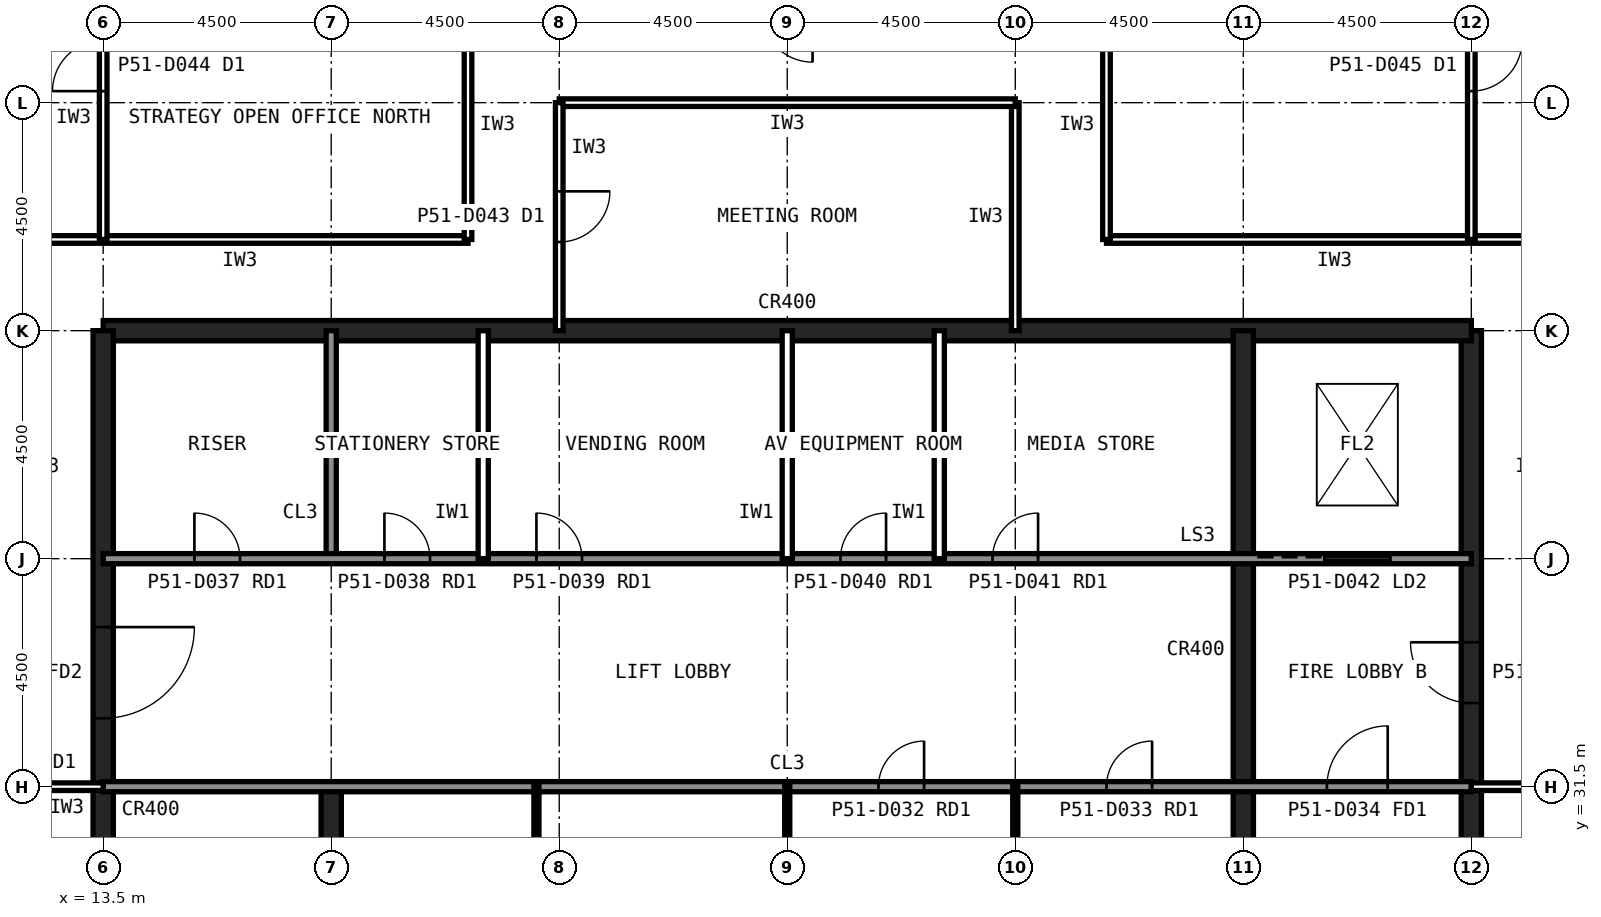
"""IFC4 building model, lengths in metres.
Left out: names, types, materials, properties, quantities, classifications, styles, units other than length and angle.
Written with IfcOpenShell. Run it as: python <this file> out.ifc"""

import sys

from ifc_helpers import new_model, si_unit, direction, frame, frame_2d, origin, place, context, subcontext, project, spatial, rectangle, extrude, element, fill, save


model = new_model("IFC4")
c1 = context("Model", 3, precision=1e-05, world=origin(), true_north=direction((0.0, 1.0)))
c2 = subcontext(c1, "Body", "Model", "MODEL_VIEW")
j1 = project(units=[si_unit("LENGTHUNIT", "METRE"), si_unit("PLANEANGLEUNIT", "RADIAN")], contexts=[c1])
p1 = place(None, origin())
s1 = spatial("IfcSite", under=j1, at=p1, CompositionType="ELEMENT")
p2 = place(p1, origin())
s2 = spatial("IfcBuilding", under=s1, at=p2, CompositionType="ELEMENT")
p3 = place(p2, frame((0.0, 0.0, 214.6)))
s3 = spatial("IfcBuildingStorey", under=s2, at=p3, CompositionType="ELEMENT", Elevation=214.6)
p4 = place(p3, frame((40.5, 13.5, 0.0), z_axis=(0.0, 0.0, 1.0), x_axis=(0.0, 1.0, 0.0)))
e1 = element("IfcWall", 1, at=p4, inside=s3, PredefinedType="SHEAR", context=c2, shape_type="SweptSolid", body=[
    extrude(rectangle(XDim=27.0, YDim=0.4, at=frame_2d((13.5, 0.0))), origin(), (0.0, 0.0, 1.0), 4.0),
])
p5 = place(p4, frame((5.85, 0.0, 0.0)))
e2 = element("IfcOpeningElement", 2, at=p5, cuts=e1, PredefinedType="OPENING", context=c2, shape_type="SweptSolid", body=[
    extrude(rectangle(XDim=1.8, YDim=2.1, at=frame_2d((0.9, 1.05))), frame((0.0, 0.21, 0.0), z_axis=(0.0, -1.0, 0.0), x_axis=(1.0, 0.0, 0.0)), (0.0, 0.0, 1.0), 0.42),
])
p6 = place(p4, frame((19.65, 0.0, 0.0)))
e3 = element("IfcOpeningElement", 3, at=p6, cuts=e1, PredefinedType="OPENING", context=c2, shape_type="SweptSolid", body=[
    extrude(rectangle(XDim=1.2, YDim=2.1, at=frame_2d((0.6, 1.05))), frame((0.0, 0.21, 0.0), z_axis=(0.0, -1.0, 0.0), x_axis=(1.0, 0.0, 0.0)), (0.0, 0.0, 1.0), 0.42),
])
p7 = place(p3, frame((40.5, 40.5, 0.0), z_axis=(0.0, 0.0, 1.0), x_axis=(-1.0, 0.0, 0.0)))
e4 = element("IfcWall", 4, at=p7, inside=s3, PredefinedType="SHEAR", context=c2, shape_type="SweptSolid", body=[
    extrude(rectangle(XDim=27.0, YDim=0.4, at=frame_2d((13.5, 0.0))), origin(), (0.0, 0.0, 1.0), 4.0),
])
p8 = place(p3, frame((13.5, 40.5, 0.0), z_axis=(0.0, 0.0, 1.0), x_axis=(0.0, -1.0, 0.0)))
e5 = element("IfcWall", 5, at=p8, inside=s3, PredefinedType="SHEAR", context=c2, shape_type="SweptSolid", body=[
    extrude(rectangle(XDim=27.0, YDim=0.4, at=frame_2d((13.5, 0.0))), origin(), (0.0, 0.0, 1.0), 4.0),
])
p9 = place(p8, frame((19.65, 0.0, 0.0)))
e6 = element("IfcOpeningElement", 6, at=p9, cuts=e5, PredefinedType="OPENING", context=c2, shape_type="SweptSolid", body=[
    extrude(rectangle(XDim=1.2, YDim=2.1, at=frame_2d((0.6, 1.05))), frame((0.0, 0.21, 0.0), z_axis=(0.0, -1.0, 0.0), x_axis=(1.0, 0.0, 0.0)), (0.0, 0.0, 1.0), 0.42),
])
p10 = place(p8, frame((5.85, 0.0, 0.0)))
e7 = element("IfcOpeningElement", 7, at=p10, cuts=e5, PredefinedType="OPENING", context=c2, shape_type="SweptSolid", body=[
    extrude(rectangle(XDim=1.8, YDim=2.1, at=frame_2d((0.9, 1.05))), frame((0.0, 0.21, 0.0), z_axis=(0.0, -1.0, 0.0), x_axis=(1.0, 0.0, 0.0)), (0.0, 0.0, 1.0), 0.42),
])
p11 = place(p3, frame((18.0, 13.5, 0.0), z_axis=(0.0, 0.0, 1.0), x_axis=(0.0, 1.0, 0.0)))
e8 = element("IfcWall", 8, at=p11, inside=s3, PredefinedType="SHEAR", context=c2, shape_type="SweptSolid", body=[
    extrude(rectangle(XDim=18.0, YDim=0.4, at=frame_2d((9.0, 0.0))), origin(), (0.0, 0.0, 1.0), 4.0),
])
p12 = place(p3, frame((18.0, 36.0, 0.0), z_axis=(0.0, 0.0, 1.0), x_axis=(0.0, 1.0, 0.0)))
e9 = element("IfcWall", 9, at=p12, inside=s3, PredefinedType="SOLIDWALL", context=c2, shape_type="SweptSolid", body=[
    extrude(rectangle(XDim=4.5, YDim=0.2, at=frame_2d((2.25, 0.0))), origin(), (0.0, 0.0, 1.0), 3.84),
])
p13 = place(p3, frame((36.0, 22.5, 0.0), z_axis=(0.0, 0.0, 1.0), x_axis=(0.0, 1.0, 0.0)))
e10 = element("IfcWall", 10, at=p13, inside=s3, PredefinedType="SHEAR", context=c2, shape_type="SweptSolid", body=[
    extrude(rectangle(XDim=18.0, YDim=0.4, at=frame_2d((9.0, 0.0))), origin(), (0.0, 0.0, 1.0), 4.0),
])
p14 = place(p3, frame((13.5, 36.0, 0.0), z_axis=(0.0, 0.0, 1.0), x_axis=(1.0, 0.0, 0.0)))
e11 = element("IfcWall", 11, at=p14, inside=s3, PredefinedType="SOLIDWALL", context=c2, shape_type="SweptSolid", body=[
    extrude(rectangle(XDim=27.0, YDim=0.2, at=frame_2d((13.5, 0.0))), origin(), (0.0, 0.0, 1.0), 3.84),
])
p15 = place(p14, frame((1.8, 0.0, 0.0)))
e12 = element("IfcOpeningElement", 12, at=p15, cuts=e11, PredefinedType="OPENING", context=c2, shape_type="SweptSolid", body=[
    extrude(rectangle(XDim=0.9, YDim=2.1, at=frame_2d((0.45, 1.05))), frame((0.0, 0.11, 0.0), z_axis=(0.0, -1.0, 0.0), x_axis=(1.0, 0.0, 0.0)), (0.0, 0.0, 1.0), 0.22),
])
p16 = place(p14, frame((5.55, 0.0, 0.0)))
e13 = element("IfcOpeningElement", 13, at=p16, cuts=e11, PredefinedType="OPENING", context=c2, shape_type="SweptSolid", body=[
    extrude(rectangle(XDim=0.9, YDim=2.1, at=frame_2d((0.45, 1.05))), frame((0.0, 0.11, 0.0), z_axis=(0.0, -1.0, 0.0), x_axis=(1.0, 0.0, 0.0)), (0.0, 0.0, 1.0), 0.22),
])
p17 = place(p14, frame((11.55, 0.0, 0.0)))
e14 = element("IfcOpeningElement", 14, at=p17, cuts=e11, PredefinedType="OPENING", context=c2, shape_type="SweptSolid", body=[
    extrude(rectangle(XDim=0.9, YDim=2.1, at=frame_2d((0.45, 1.05))), frame((0.0, 0.11, 0.0), z_axis=(0.0, -1.0, 0.0), x_axis=(1.0, 0.0, 0.0)), (0.0, 0.0, 1.0), 0.22),
])
p18 = place(p14, frame((14.55, 0.0, 0.0)))
e15 = element("IfcOpeningElement", 15, at=p18, cuts=e11, PredefinedType="OPENING", context=c2, shape_type="SweptSolid", body=[
    extrude(rectangle(XDim=0.9, YDim=2.1, at=frame_2d((0.45, 1.05))), frame((0.0, 0.11, 0.0), z_axis=(0.0, -1.0, 0.0), x_axis=(1.0, 0.0, 0.0)), (0.0, 0.0, 1.0), 0.22),
])
p19 = place(p14, frame((20.55, 0.0, 0.0)))
e16 = element("IfcOpeningElement", 16, at=p19, cuts=e11, PredefinedType="OPENING", context=c2, shape_type="SweptSolid", body=[
    extrude(rectangle(XDim=0.9, YDim=2.1, at=frame_2d((0.45, 1.05))), frame((0.0, 0.11, 0.0), z_axis=(0.0, -1.0, 0.0), x_axis=(1.0, 0.0, 0.0)), (0.0, 0.0, 1.0), 0.22),
])
p20 = place(p14, frame((24.1, 0.0, 0.0)))
e17 = element("IfcOpeningElement", 17, at=p20, cuts=e11, PredefinedType="OPENING", context=c2, shape_type="SweptSolid", body=[
    extrude(rectangle(XDim=1.3, YDim=2.2, at=frame_2d((0.65, 1.1))), frame((0.0, 0.11, 0.0), z_axis=(0.0, -1.0, 0.0), x_axis=(1.0, 0.0, 0.0)), (0.0, 0.0, 1.0), 0.22),
])
p21 = place(p3, frame((13.5, 31.5, 0.0), z_axis=(0.0, 0.0, 1.0), x_axis=(1.0, 0.0, 0.0)))
e18 = element("IfcWall", 18, at=p21, inside=s3, PredefinedType="SOLIDWALL", context=c2, shape_type="SweptSolid", body=[
    extrude(rectangle(XDim=27.0, YDim=0.2, at=frame_2d((13.5, 0.0))), origin(), (0.0, 0.0, 1.0), 3.84),
])
p22 = place(p21, frame((24.15, 0.0, 0.0)))
e19 = element("IfcOpeningElement", 19, at=p22, cuts=e18, PredefinedType="OPENING", context=c2, shape_type="SweptSolid", body=[
    extrude(rectangle(XDim=1.2, YDim=2.1, at=frame_2d((0.6, 1.05))), frame((0.0, 0.11, 0.0), z_axis=(0.0, -1.0, 0.0), x_axis=(1.0, 0.0, 0.0)), (0.0, 0.0, 1.0), 0.22),
])
p23 = place(p21, frame((15.3, 0.0, 0.0)))
e20 = element("IfcOpeningElement", 20, at=p23, cuts=e18, PredefinedType="OPENING", context=c2, shape_type="SweptSolid", body=[
    extrude(rectangle(XDim=0.9, YDim=2.1, at=frame_2d((0.45, 1.05))), frame((0.0, 0.11, 0.0), z_axis=(0.0, -1.0, 0.0), x_axis=(1.0, 0.0, 0.0)), (0.0, 0.0, 1.0), 0.22),
])
p24 = place(p21, frame((19.8, 0.0, 0.0)))
e21 = element("IfcOpeningElement", 21, at=p24, cuts=e18, PredefinedType="OPENING", context=c2, shape_type="SweptSolid", body=[
    extrude(rectangle(XDim=0.9, YDim=2.1, at=frame_2d((0.45, 1.05))), frame((0.0, 0.11, 0.0), z_axis=(0.0, -1.0, 0.0), x_axis=(1.0, 0.0, 0.0)), (0.0, 0.0, 1.0), 0.22),
])
for number, where, z_axis, x_axis in (
    (22, (24.0, 36.0, 0.0), (0.0, 0.0, 1.0), (0.0, 1.0, 0.0)),
    (23, (27.0, 36.0, 0.0), (0.0, 0.0, 1.0), (0.0, 1.0, 0.0)),
    (24, (33.0, 36.0, 0.0), (0.0, 0.0, 1.0), (0.0, 1.0, 0.0)),
):
    element("IfcWall", number, at=place(p3, frame(where, z_axis=z_axis, x_axis=x_axis)), inside=s3, PredefinedType="PARTITIONING", context=c2, shape_type="SweptSolid", body=[
        extrude(rectangle(XDim=4.5, YDim=0.2, at=frame_2d((2.25, 0.0))), origin(), (0.0, 0.0, 1.0), 3.84),
    ])
for number, where, z_axis, x_axis in (
    (25, (22.05, 22.5, 0.0), (0.0, 0.0, 1.0), (0.0, 1.0, 0.0)),
    (26, (27.0, 22.5, 0.0), (0.0, 0.0, 1.0), (0.0, 1.0, 0.0)),
    (27, (31.5, 22.5, 0.0), (0.0, 0.0, 1.0), (0.0, 1.0, 0.0)),
):
    element("IfcWall", number, at=place(p3, frame(where, z_axis=z_axis, x_axis=x_axis)), inside=s3, PredefinedType="PLUMBINGWALL", context=c2, shape_type="SweptSolid", body=[
        extrude(rectangle(XDim=9.0, YDim=0.1, at=frame_2d((4.5, 0.0))), origin(), (0.0, 0.0, 1.0), 3.84),
    ])
for number, where, z_axis, x_axis in (
    (28, (20.7, 42.3, 0.0), (0.0, 0.0, 1.0), (-1.0, 0.0, 0.0)),
    (29, (42.3, 42.3, 0.0), (0.0, 0.0, 1.0), (-1.0, 0.0, 0.0)),
):
    element("IfcWall", number, at=place(p3, frame(where, z_axis=z_axis, x_axis=x_axis)), inside=s3, PredefinedType="PARTITIONING", context=c2, shape_type="SweptSolid", body=[
        extrude(rectangle(XDim=9.0, YDim=0.15, at=frame_2d((4.5, 0.0))), origin(), (0.0, 0.0, 1.0), 3.84),
    ])
for number, where, z_axis, x_axis in (
    (30, (20.7, 46.8, 0.0), (0.0, 0.0, 1.0), (0.0, -1.0, 0.0)),
    (31, (33.3, 42.3, 0.0), (0.0, 0.0, 1.0), (0.0, 1.0, 0.0)),
):
    element("IfcWall", number, at=place(p3, frame(where, z_axis=z_axis, x_axis=x_axis)), inside=s3, PredefinedType="PARTITIONING", context=c2, shape_type="SweptSolid", body=[
        extrude(rectangle(XDim=4.5, YDim=0.15, at=frame_2d((2.25, 0.0))), origin(), (0.0, 0.0, 1.0), 3.84),
    ])
p25 = place(p3, frame((31.5, 40.5, 0.0), z_axis=(0.0, 0.0, 1.0), x_axis=(0.0, 1.0, 0.0)))
e32 = element("IfcWall", 32, at=p25, inside=s3, PredefinedType="PARTITIONING", context=c2, shape_type="SweptSolid", body=[
    extrude(rectangle(XDim=4.5, YDim=0.15, at=frame_2d((2.25, 0.0))), origin(), (0.0, 0.0, 1.0), 2.989),
])
p26 = place(p3, frame((31.5, 45.0, 0.0), z_axis=(0.0, 0.0, 1.0), x_axis=(-1.0, 0.0, 0.0)))
e33 = element("IfcWall", 33, at=p26, inside=s3, PredefinedType="PARTITIONING", context=c2, shape_type="SweptSolid", body=[
    extrude(rectangle(XDim=9.0, YDim=0.15, at=frame_2d((4.5, 0.0))), origin(), (0.0, 0.0, 1.0), 3.84),
])
p27 = place(p3, frame((22.5, 45.0, 0.0), z_axis=(0.0, 0.0, 1.0), x_axis=(0.0, -1.0, 0.0)))
e34 = element("IfcWall", 34, at=p27, inside=s3, PredefinedType="PARTITIONING", context=c2, shape_type="SweptSolid", body=[
    extrude(rectangle(XDim=4.5, YDim=0.15, at=frame_2d((2.25, 0.0))), origin(), (0.0, 0.0, 1.0), 2.989),
])
p28 = place(p27, frame((1.75, 0.0, 0.0)))
e35 = element("IfcOpeningElement", 35, at=p28, cuts=e34, PredefinedType="OPENING", context=c2, shape_type="SweptSolid", body=[
    extrude(rectangle(XDim=1.0, YDim=2.1, at=frame_2d((0.5, 1.05))), frame((0.0, 0.085, 0.0), z_axis=(0.0, -1.0, 0.0), x_axis=(1.0, 0.0, 0.0)), (0.0, 0.0, 1.0), 0.17),
])
p29 = place(p3, frame((45.0, 31.5, 0.0), z_axis=(0.0, 0.0, 1.0), x_axis=(-1.0, 0.0, 0.0)))
e36 = element("IfcWall", 36, at=p29, inside=s3, PredefinedType="PARTITIONING", context=c2, shape_type="SweptSolid", body=[
    extrude(rectangle(XDim=4.5, YDim=0.15, at=frame_2d((2.25, 0.0))), origin(), (0.0, 0.0, 1.0), 2.989),
])
p30 = place(p29, frame((1.75, 0.0, 0.0)))
e37 = element("IfcOpeningElement", 37, at=p30, cuts=e36, PredefinedType="OPENING", context=c2, shape_type="SweptSolid", body=[
    extrude(rectangle(XDim=1.0, YDim=2.1, at=frame_2d((0.5, 1.05))), frame((0.0, 0.085, 0.0), z_axis=(0.0, -1.0, 0.0), x_axis=(1.0, 0.0, 0.0)), (0.0, 0.0, 1.0), 0.17),
])
p31 = place(p3, frame((13.5, 31.5, 0.0), z_axis=(0.0, 0.0, 1.0), x_axis=(-1.0, 0.0, 0.0)))
e38 = element("IfcWall", 38, at=p31, inside=s3, PredefinedType="PARTITIONING", context=c2, shape_type="SweptSolid", body=[
    extrude(rectangle(XDim=3.6, YDim=0.15, at=frame_2d((1.8, 0.0))), origin(), (0.0, 0.0, 1.0), 2.989),
])
p32 = place(p31, frame((1.3, 0.0, 0.0)))
e39 = element("IfcOpeningElement", 39, at=p32, cuts=e38, PredefinedType="OPENING", context=c2, shape_type="SweptSolid", body=[
    extrude(rectangle(XDim=1.0, YDim=2.1, at=frame_2d((0.5, 1.05))), frame((0.0, 0.085, 0.0), z_axis=(0.0, -1.0, 0.0), x_axis=(1.0, 0.0, 0.0)), (0.0, 0.0, 1.0), 0.17),
])
p33 = place(p3, frame((40.5, 49.155, 0.0), z_axis=(0.0, 0.0, 1.0), x_axis=(0.0, -1.0, 0.0)))
e40 = element("IfcWall", 40, at=p33, inside=s3, PredefinedType="PARTITIONING", context=c2, shape_type="SweptSolid", body=[
    extrude(rectangle(XDim=6.855, YDim=0.15, at=frame_2d((3.427, 0.0))), origin(), (0.0, 0.0, 1.0), 2.989),
])
p34 = place(p33, frame((2.927, 0.0, 0.0)))
e41 = element("IfcOpeningElement", 41, at=p34, cuts=e40, PredefinedType="OPENING", context=c2, shape_type="SweptSolid", body=[
    extrude(rectangle(XDim=1.0, YDim=2.1, at=frame_2d((0.5, 1.05))), frame((0.0, 0.085, 0.0), z_axis=(0.0, -1.0, 0.0), x_axis=(1.0, 0.0, 0.0)), (0.0, 0.0, 1.0), 0.17),
])
p35 = place(p3, frame((13.5, 42.3, 0.0), z_axis=(0.0, 0.0, 1.0), x_axis=(0.0, 1.0, 0.0)))
e42 = element("IfcWall", 42, at=p35, inside=s3, PredefinedType="PARTITIONING", context=c2, shape_type="SweptSolid", body=[
    extrude(rectangle(XDim=6.855, YDim=0.15, at=frame_2d((3.427, 0.0))), origin(), (0.0, 0.0, 1.0), 2.989),
])
p36 = place(p35, frame((2.927, 0.0, 0.0)))
e43 = element("IfcOpeningElement", 43, at=p36, cuts=e42, PredefinedType="OPENING", context=c2, shape_type="SweptSolid", body=[
    extrude(rectangle(XDim=1.0, YDim=2.1, at=frame_2d((0.5, 1.05))), frame((0.0, 0.085, 0.0), z_axis=(0.0, -1.0, 0.0), x_axis=(1.0, 0.0, 0.0)), (0.0, 0.0, 1.0), 0.17),
])
p37 = place(p10, origin())
e44 = element("IfcDoor", 44, at=p37, inside=s3, OperationType="SINGLE_SWING_LEFT", PredefinedType="DOOR", context=c2, shape_type="SweptSolid", body=[
    extrude(rectangle(XDim=1.8, YDim=2.1, at=frame_2d((0.9, 1.05))), frame((0.0, 0.025, 0.0), z_axis=(0.0, -1.0, 0.0), x_axis=(1.0, 0.0, 0.0)), (0.0, 0.0, 1.0), 0.05),
])
fill(e7, e44)
p38 = place(p6, origin())
e45 = element("IfcDoor", 45, at=p38, inside=s3, OperationType="SINGLE_SWING_RIGHT", PredefinedType="DOOR", context=c2, shape_type="SweptSolid", body=[
    extrude(rectangle(XDim=1.2, YDim=2.1, at=frame_2d((0.6, 1.05))), frame((0.0, 0.025, 0.0), z_axis=(0.0, -1.0, 0.0), x_axis=(1.0, 0.0, 0.0)), (0.0, 0.0, 1.0), 0.05),
])
fill(e3, e45)
p39 = place(p22, origin())
e46 = element("IfcDoor", 46, at=p39, inside=s3, OperationType="SINGLE_SWING_RIGHT", PredefinedType="DOOR", context=c2, shape_type="SweptSolid", body=[
    extrude(rectangle(XDim=1.2, YDim=2.1, at=frame_2d((0.6, 1.05))), frame((0.0, 0.025, 0.0), z_axis=(0.0, -1.0, 0.0), x_axis=(1.0, 0.0, 0.0)), (0.0, 0.0, 1.0), 0.05),
])
fill(e19, e46)
p40 = place(p23, origin())
e47 = element("IfcDoor", 47, at=p40, inside=s3, OperationType="SINGLE_SWING_RIGHT", PredefinedType="DOOR", context=c2, shape_type="SweptSolid", body=[
    extrude(rectangle(XDim=0.9, YDim=2.1, at=frame_2d((0.45, 1.05))), frame((0.0, 0.025, 0.0), z_axis=(0.0, -1.0, 0.0), x_axis=(1.0, 0.0, 0.0)), (0.0, 0.0, 1.0), 0.05),
])
fill(e20, e47)
p41 = place(p24, origin())
e48 = element("IfcDoor", 48, at=p41, inside=s3, OperationType="SINGLE_SWING_RIGHT", PredefinedType="DOOR", context=c2, shape_type="SweptSolid", body=[
    extrude(rectangle(XDim=0.9, YDim=2.1, at=frame_2d((0.45, 1.05))), frame((0.0, 0.025, 0.0), z_axis=(0.0, -1.0, 0.0), x_axis=(1.0, 0.0, 0.0)), (0.0, 0.0, 1.0), 0.05),
])
fill(e21, e48)
p42 = place(p15, origin())
e49 = element("IfcDoor", 49, at=p42, inside=s3, OperationType="SINGLE_SWING_LEFT", PredefinedType="DOOR", context=c2, shape_type="SweptSolid", body=[
    extrude(rectangle(XDim=0.9, YDim=2.1, at=frame_2d((0.45, 1.05))), frame((0.0, 0.025, 0.0), z_axis=(0.0, -1.0, 0.0), x_axis=(1.0, 0.0, 0.0)), (0.0, 0.0, 1.0), 0.05),
])
fill(e12, e49)
p43 = place(p16, origin())
e50 = element("IfcDoor", 50, at=p43, inside=s3, OperationType="SINGLE_SWING_LEFT", PredefinedType="DOOR", context=c2, shape_type="SweptSolid", body=[
    extrude(rectangle(XDim=0.9, YDim=2.1, at=frame_2d((0.45, 1.05))), frame((0.0, 0.025, 0.0), z_axis=(0.0, -1.0, 0.0), x_axis=(1.0, 0.0, 0.0)), (0.0, 0.0, 1.0), 0.05),
])
fill(e13, e50)
p44 = place(p17, origin())
e51 = element("IfcDoor", 51, at=p44, inside=s3, OperationType="SINGLE_SWING_LEFT", PredefinedType="DOOR", context=c2, shape_type="SweptSolid", body=[
    extrude(rectangle(XDim=0.9, YDim=2.1, at=frame_2d((0.45, 1.05))), frame((0.0, 0.025, 0.0), z_axis=(0.0, -1.0, 0.0), x_axis=(1.0, 0.0, 0.0)), (0.0, 0.0, 1.0), 0.05),
])
fill(e14, e51)
p45 = place(p18, origin())
e52 = element("IfcDoor", 52, at=p45, inside=s3, OperationType="SINGLE_SWING_RIGHT", PredefinedType="DOOR", context=c2, shape_type="SweptSolid", body=[
    extrude(rectangle(XDim=0.9, YDim=2.1, at=frame_2d((0.45, 1.05))), frame((0.0, 0.025, 0.0), z_axis=(0.0, -1.0, 0.0), x_axis=(1.0, 0.0, 0.0)), (0.0, 0.0, 1.0), 0.05),
])
fill(e15, e52)
p46 = place(p19, origin())
e53 = element("IfcDoor", 53, at=p46, inside=s3, OperationType="SINGLE_SWING_RIGHT", PredefinedType="DOOR", context=c2, shape_type="SweptSolid", body=[
    extrude(rectangle(XDim=0.9, YDim=2.1, at=frame_2d((0.45, 1.05))), frame((0.0, 0.025, 0.0), z_axis=(0.0, -1.0, 0.0), x_axis=(1.0, 0.0, 0.0)), (0.0, 0.0, 1.0), 0.05),
])
fill(e16, e53)
p47 = place(p20, origin())
e54 = element("IfcDoor", 54, at=p47, inside=s3, OperationType="SLIDING_TO_LEFT", PredefinedType="DOOR", context=c2, shape_type="SweptSolid", body=[
    extrude(rectangle(XDim=1.3, YDim=2.2, at=frame_2d((0.65, 1.1))), frame((0.0, 0.025, 0.0), z_axis=(0.0, -1.0, 0.0), x_axis=(1.0, 0.0, 0.0)), (0.0, 0.0, 1.0), 0.05),
])
fill(e17, e54)
p48 = place(p28, origin())
e55 = element("IfcDoor", 55, at=p48, inside=s3, OperationType="SINGLE_SWING_LEFT", PredefinedType="DOOR", context=c2, shape_type="SweptSolid", body=[
    extrude(rectangle(XDim=1.0, YDim=2.1, at=frame_2d((0.5, 1.05))), frame((0.0, 0.025, 0.0), z_axis=(0.0, -1.0, 0.0), x_axis=(1.0, 0.0, 0.0)), (0.0, 0.0, 1.0), 0.05),
])
fill(e35, e55)
p49 = place(p34, origin())
e56 = element("IfcDoor", 56, at=p49, inside=s3, OperationType="SINGLE_SWING_LEFT", PredefinedType="DOOR", context=c2, shape_type="SweptSolid", body=[
    extrude(rectangle(XDim=1.0, YDim=2.1, at=frame_2d((0.5, 1.05))), frame((0.0, 0.025, 0.0), z_axis=(0.0, -1.0, 0.0), x_axis=(1.0, 0.0, 0.0)), (0.0, 0.0, 1.0), 0.05),
])
fill(e41, e56)
p50 = place(p36, origin())
e57 = element("IfcDoor", 57, at=p50, inside=s3, OperationType="SINGLE_SWING_LEFT", PredefinedType="DOOR", context=c2, shape_type="SweptSolid", body=[
    extrude(rectangle(XDim=1.0, YDim=2.1, at=frame_2d((0.5, 1.05))), frame((0.0, 0.025, 0.0), z_axis=(0.0, -1.0, 0.0), x_axis=(1.0, 0.0, 0.0)), (0.0, 0.0, 1.0), 0.05),
])
fill(e43, e57)
save(model, sys.argv[1])
